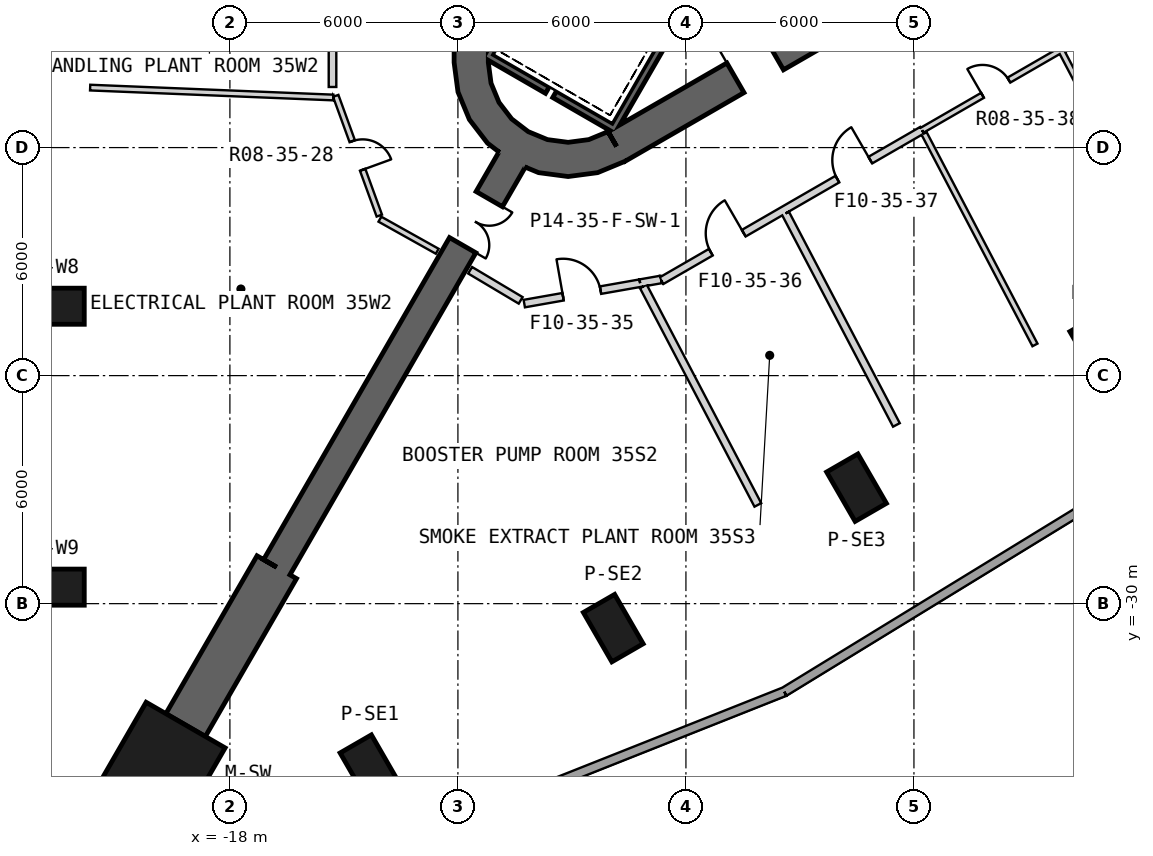
"""IFC4 building model, lengths in metres.
Left out: names, types, materials, properties, quantities, classifications, styles, units other than length and angle.
Written with IfcOpenShell. Run it as: python <this file> out.ifc"""

import sys

from ifc_helpers import new_model, si_unit, direction, frame, frame_2d, origin, origin_2d, place, context, subcontext, project, spatial, polyline, rectangle, outline, extrude, element, fill, save


model = new_model("IFC4")
c1 = context("Model", 3, precision=1e-05, world=origin(), true_north=direction((0.0, 1.0)))
c2 = subcontext(c1, "Body", "Model", "MODEL_VIEW")
j1 = project(units=[si_unit("LENGTHUNIT", "METRE"), si_unit("PLANEANGLEUNIT", "RADIAN")], contexts=[c1])
p1 = place(None, origin())
s1 = spatial("IfcSite", under=j1, at=p1, CompositionType="ELEMENT")
p2 = place(p1, origin())
s2 = spatial("IfcBuilding", under=s1, at=p2, CompositionType="ELEMENT")
p3 = place(p2, frame((0.0, 0.0, 163.2)))
s3 = spatial("IfcBuildingStorey", under=s2, at=p3, CompositionType="ELEMENT", Elevation=163.2)
p4 = place(p3, frame((-19.915, -34.494, 0.0), z_axis=(0.0, 0.0, 1.0), x_axis=(-0.5, -0.866025403784, 0.0)))
e1 = element("IfcColumn", 1, at=p4, inside=s3, PredefinedType="COLUMN", context=c2, shape_type="SweptSolid", body=[
    extrude(rectangle(XDim=3.0, YDim=2.4, at=origin_2d()), origin(), (0.0, 0.0, 1.0), 5.7),
])
for number, where, z_axis, x_axis in (
    (2, (-22.583, -22.174, 0.0), (0.0, 0.0, 1.0), (-1.0, 0.0, 0.0)),
    (3, (-22.583, -29.566, 0.0), (0.0, 0.0, 1.0), (-1.0, 0.0, 0.0)),
    (4, (-14.313, -34.34, 0.0), (0.0, 0.0, 1.0), (0.5, -0.866, 0.0)),
    (5, (-7.912, -30.644, 0.0), (0.0, 0.0, 1.0), (0.5, -0.866, 0.0)),
    (6, (-1.511, -26.948, 0.0), (0.0, 0.0, 1.0), (0.5, -0.866, 0.0)),
    (7, (4.89, -23.253, 0.0), (0.0, 0.0, 1.0), (0.5, -0.866, 0.0)),
):
    element("IfcColumn", number, at=place(p3, frame(where, z_axis=z_axis, x_axis=x_axis)), inside=s3, PredefinedType="COLUMN", context=c2, shape_type="SweptSolid", body=[
        extrude(rectangle(XDim=1.5, YDim=0.95, at=origin_2d()), origin(), (0.0, 0.0, 1.0), 5.7),
    ])
p5 = place(p3, frame((-11.65, 15.762, 0.0), z_axis=(0.0, 0.0, 1.0), x_axis=(0.0, -1.0, 0.0)))
e8 = element("IfcWall", 8, at=p5, inside=s3, PredefinedType="SHEAR", context=c2, shape_type="SweptSolid", body=[
    extrude(rectangle(XDim=31.523, YDim=0.9, at=frame_2d((15.762, 0.0))), origin(), (0.0, 0.0, 1.0), 6.0),
])
p6 = place(p5, frame((3.612, 0.0, 0.0)))
e9 = element("IfcOpeningElement", 9, at=p6, cuts=e8, PredefinedType="OPENING", context=c2, shape_type="SweptSolid", body=[
    extrude(rectangle(XDim=1.2, YDim=2.4, at=frame_2d((0.6, 1.2))), frame((0.0, 0.46, 0.0), z_axis=(0.0, -1.0, 0.0), x_axis=(1.0, 0.0, 0.0)), (0.0, 0.0, 1.0), 0.92),
])
p7 = place(p5, frame((26.712, 0.0, 0.0)))
e10 = element("IfcOpeningElement", 10, at=p7, cuts=e8, PredefinedType="OPENING", context=c2, shape_type="SweptSolid", body=[
    extrude(rectangle(XDim=1.2, YDim=2.4, at=frame_2d((0.6, 1.2))), frame((0.0, 0.46, 0.0), z_axis=(0.0, -1.0, 0.0), x_axis=(1.0, 0.0, 0.0)), (0.0, 0.0, 1.0), 0.92),
])
p8 = place(p3, frame((-7.825, -17.97, 0.0), z_axis=(0.0, 0.0, 1.0), x_axis=(0.866028369851, 0.499994862586, 0.0)))
e11 = element("IfcWall", 11, at=p8, inside=s3, PredefinedType="SHEAR", context=c2, shape_type="SweptSolid", body=[
    extrude(rectangle(XDim=31.523, YDim=0.9, at=frame_2d((15.762, 0.0))), origin(), (0.0, 0.0, 1.0), 6.0),
])
p9 = place(p8, frame((26.712, 0.0, 0.0)))
e12 = element("IfcOpeningElement", 12, at=p9, cuts=e11, PredefinedType="OPENING", context=c2, shape_type="SweptSolid", body=[
    extrude(rectangle(XDim=1.2, YDim=2.4, at=frame_2d((0.6, 1.2))), frame((0.0, 0.46, 0.0), z_axis=(0.0, -1.0, 0.0), x_axis=(1.0, 0.0, 0.0)), (0.0, 0.0, 1.0), 0.92),
])
p10 = place(p8, frame((3.612, 0.0, 0.0)))
e13 = element("IfcOpeningElement", 13, at=p10, cuts=e11, PredefinedType="OPENING", context=c2, shape_type="SweptSolid", body=[
    extrude(rectangle(XDim=1.2, YDim=2.4, at=frame_2d((0.6, 1.2))), frame((0.0, 0.46, 0.0), z_axis=(0.0, -1.0, 0.0), x_axis=(1.0, 0.0, 0.0)), (0.0, 0.0, 1.0), 0.92),
])
p11 = place(p3, origin())
e14 = element("IfcWall", 14, at=p11, inside=s3, PredefinedType="SHEAR", context=c2, shape_type="SweptSolid", body=[
    extrude(outline(polyline([(-12.1, -15.762), (-11.998, -16.538), (-11.698, -17.262), (-11.221, -17.883), (-10.6, -18.36), (-9.876, -18.659), (-9.1, -18.762), (-8.323, -18.659), (-7.6, -18.36), (-8.05, -17.58), (-8.556, -17.79), (-9.1, -17.862), (-9.644, -17.79), (-10.15, -17.58), (-10.585, -17.247), (-10.919, -16.812), (-11.128, -16.305), (-11.2, -15.762), (-12.1, -15.762)])), origin(), (0.0, 0.0, 1.0), 6.0),
])
p12 = place(p3, frame((-10.575, -18.316, 0.0), z_axis=(0.0, 0.0, 1.0), x_axis=(-0.500002326941, -0.86602406032, 0.0)))
e15 = element("IfcWall", 15, at=p12, inside=s3, PredefinedType="SHEAR", context=c2, shape_type="SweptSolid", body=[
    extrude(rectangle(XDim=12.384, YDim=0.8, at=frame_2d((6.192, 0.0))), origin(), (0.0, 0.0, 1.0), 6.0),
])
p13 = place(p12, frame((1.2, 0.0, 0.0)))
e16 = element("IfcOpeningElement", 16, at=p13, cuts=e15, PredefinedType="OPENING", context=c2, shape_type="SweptSolid", body=[
    extrude(rectangle(XDim=1.4, YDim=2.4, at=frame_2d((0.7, 1.2))), frame((0.0, 0.41, 0.0), z_axis=(0.0, -1.0, 0.0), x_axis=(1.0, 0.0, 0.0)), (0.0, 0.0, 1.0), 0.82),
])
p14 = place(p3, frame((-16.767, -29.041, -0.35), z_axis=(0.0, 0.0, 1.0), x_axis=(-0.499998569178, -0.866026229868, 0.0)))
e17 = element("IfcWall", 17, at=p14, inside=s3, PredefinedType="SHEAR", context=c2, shape_type="SweptSolid", body=[
    extrude(rectangle(XDim=4.796, YDim=1.2, at=frame_2d((2.398, 0.0))), origin(), (0.0, 0.0, 1.0), 6.35),
])
p15 = place(p3, frame((-15.368, -37.064, 0.0), z_axis=(0.0, 0.0, 1.0), x_axis=(0.929454976671, 0.368935558522, 0.0)))
e18 = element("IfcWall", 18, at=p15, inside=s3, PredefinedType="SOLIDWALL", context=c2, shape_type="SweptSolid", body=[
    extrude(rectangle(XDim=12.866, YDim=0.24, at=frame_2d((6.433, 0.0))), origin(), (0.0, 0.0, 1.0), 5.7),
])
p16 = place(p3, frame((-3.41, -32.318, 0.0), z_axis=(0.0, 0.0, 1.0), x_axis=(0.852773716093, 0.52228056554, 0.0)))
e19 = element("IfcWall", 19, at=p16, inside=s3, PredefinedType="SOLIDWALL", context=c2, shape_type="SweptSolid", body=[
    extrude(rectangle(XDim=38.239, YDim=0.24, at=frame_2d((19.12, 0.0))), origin(), (0.0, 0.0, 1.0), 5.7),
])
p17 = place(p3, frame((-3.905, -10.563, -0.35), z_axis=(0.0, 0.0, 1.0), x_axis=(-0.500012932018, -0.866017937352, 0.0)))
e20 = element("IfcWall", 20, at=p17, inside=s3, PredefinedType="SHEAR", context=c2, shape_type="SweptSolid", body=[
    extrude(rectangle(XDim=8.1, YDim=0.2, at=frame_2d((4.05, 0.0))), origin(), (0.0, 0.0, 1.0), 6.05),
])
p18 = place(p3, frame((-11.282, -15.541, -0.35), z_axis=(0.0, 0.0, 1.0), x_axis=(0.866000578957, -0.500042995397, 0.0)))
e21 = element("IfcWall", 21, at=p18, inside=s3, PredefinedType="SHEAR", context=c2, shape_type="SweptSolid", body=[
    extrude(rectangle(XDim=1.89, YDim=0.2, at=frame_2d((0.945, 0.0))), origin(), (0.0, 0.0, 1.0), 6.05),
])
p19 = place(p3, frame((-9.455, -16.596, -0.35), z_axis=(0.0, 0.0, 1.0), x_axis=(0.866038843867, -0.499976720371, 0.0)))
e22 = element("IfcWall", 22, at=p19, inside=s3, PredefinedType="SHEAR", context=c2, shape_type="SweptSolid", body=[
    extrude(rectangle(XDim=1.69, YDim=0.2, at=frame_2d((0.845, 0.0))), origin(), (0.0, 0.0, 1.0), 6.05),
])
p20 = place(p3, frame((-7.196, -8.663, -0.35), z_axis=(0.0, 0.0, 1.0), x_axis=(-0.499997992926, -0.866026562566, 0.0)))
e23 = element("IfcWall", 23, at=p20, inside=s3, PredefinedType="SHEAR", context=c2, shape_type="SweptSolid", body=[
    extrude(rectangle(XDim=7.9, YDim=0.2, at=frame_2d((3.95, 0.0))), origin(), (0.0, 0.0, 1.0), 6.05),
])
p21 = place(p3, frame((-15.3, 4.376, 0.0), z_axis=(0.0, 0.0, 1.0), x_axis=(0.0, -1.0, 0.0)))
e24 = element("IfcWall", 24, at=p21, inside=s3, PredefinedType="PARTITIONING", context=c2, shape_type="SweptSolid", body=[
    extrude(rectangle(XDim=20.781, YDim=0.2, at=frame_2d((10.391, 0.0))), origin(), (0.0, 0.0, 1.0), 4.88),
])
p22 = place(p21, frame((1.636, 0.0, 0.0)))
e25 = element("IfcOpeningElement", 25, at=p22, cuts=e24, PredefinedType="OPENING", context=c2, shape_type="SweptSolid", body=[
    extrude(rectangle(XDim=1.0, YDim=2.1, at=frame_2d((0.5, 1.05))), frame((0.0, 0.11, 0.0), z_axis=(0.0, -1.0, 0.0), x_axis=(1.0, 0.0, 0.0)), (0.0, 0.0, 1.0), 0.22),
])
p23 = place(p21, frame((5.846, 0.0, 0.0)))
e26 = element("IfcOpeningElement", 26, at=p23, cuts=e24, PredefinedType="OPENING", context=c2, shape_type="SweptSolid", body=[
    extrude(rectangle(XDim=1.0, YDim=2.1, at=frame_2d((0.5, 1.05))), frame((0.0, 0.11, 0.0), z_axis=(0.0, -1.0, 0.0), x_axis=(1.0, 0.0, 0.0)), (0.0, 0.0, 1.0), 0.22),
])
p24 = place(p21, frame((10.056, 0.0, 0.0)))
e27 = element("IfcOpeningElement", 27, at=p24, cuts=e24, PredefinedType="OPENING", context=c2, shape_type="SweptSolid", body=[
    extrude(rectangle(XDim=1.0, YDim=2.1, at=frame_2d((0.5, 1.05))), frame((0.0, 0.11, 0.0), z_axis=(0.0, -1.0, 0.0), x_axis=(1.0, 0.0, 0.0)), (0.0, 0.0, 1.0), 0.22),
])
p25 = place(p21, frame((14.266, 0.0, 0.0)))
e28 = element("IfcOpeningElement", 28, at=p25, cuts=e24, PredefinedType="OPENING", context=c2, shape_type="SweptSolid", body=[
    extrude(rectangle(XDim=1.0, YDim=2.1, at=frame_2d((0.5, 1.05))), frame((0.0, 0.11, 0.0), z_axis=(0.0, -1.0, 0.0), x_axis=(1.0, 0.0, 0.0)), (0.0, 0.0, 1.0), 0.22),
])
p26 = place(p21, frame((18.276, 0.0, 0.0)))
e29 = element("IfcOpeningElement", 29, at=p26, cuts=e24, PredefinedType="OPENING", context=c2, shape_type="SweptSolid", body=[
    extrude(rectangle(XDim=1.0, YDim=2.1, at=frame_2d((0.5, 1.05))), frame((0.0, 0.11, 0.0), z_axis=(0.0, -1.0, 0.0), x_axis=(1.0, 0.0, 0.0)), (0.0, 0.0, 1.0), 0.22),
])
p27 = place(p3, frame((-14.053, -19.884, 0.0), z_axis=(0.0, 0.0, 1.0), x_axis=(0.872734691985, -0.48819479453, 0.0)))
e30 = element("IfcWall", 30, at=p27, inside=s3, PredefinedType="PLUMBINGWALL", context=c2, shape_type="SweptSolid", body=[
    extrude(rectangle(XDim=1.729, YDim=0.15, at=frame_2d((0.864, 0.0))), origin(), (0.0, 0.0, 1.0), 5.7),
])
p28 = place(p3, frame((-15.215, -16.638, 0.0), z_axis=(0.0, 0.0, 1.0), x_axis=(0.342035327216, -0.939687094163, 0.0)))
e31 = element("IfcWall", 31, at=p28, inside=s3, PredefinedType="PLUMBINGWALL", context=c2, shape_type="SweptSolid", body=[
    extrude(rectangle(XDim=3.353, YDim=0.15, at=frame_2d((1.677, 0.0))), origin(), (0.0, 0.0, 1.0), 4.78),
])
p29 = place(p28, frame((1.27, 0.0, 0.0)))
e32 = element("IfcOpeningElement", 32, at=p29, cuts=e31, PredefinedType="OPENING", context=c2, shape_type="SweptSolid", body=[
    extrude(rectangle(XDim=0.8, YDim=2.1, at=frame_2d((0.4, 1.05))), frame((0.0, 0.085, 0.0), z_axis=(0.0, -1.0, 0.0), x_axis=(1.0, 0.0, 0.0)), (0.0, 0.0, 1.0), 0.17),
])
p30 = place(p3, frame((-15.279, -16.682, 0.0), z_axis=(0.0, 0.0, 1.0), x_axis=(-0.999169162386, 0.040755182944, 0.0)))
e33 = element("IfcWall", 33, at=p30, inside=s3, PredefinedType="PLUMBINGWALL", context=c2, shape_type="SweptSolid", body=[
    extrude(rectangle(XDim=6.404, YDim=0.15, at=frame_2d((3.202, 0.0))), origin(), (0.0, 0.0, 1.0), 4.88),
])
p31 = place(p3, frame((-10.254, -22.105, 0.0), z_axis=(0.0, 0.0, 1.0), x_axis=(0.984804988172, 0.173663857128, 0.0)))
e34 = element("IfcWall", 34, at=p31, inside=s3, PredefinedType="PARTITIONING", context=c2, shape_type="SweptSolid", body=[
    extrude(rectangle(XDim=3.096, YDim=0.2, at=frame_2d((1.548, 0.0))), origin(), (0.0, 0.0, 1.0), 4.78),
])
p32 = place(p31, frame((1.037, 0.0, 0.0)))
e35 = element("IfcOpeningElement", 35, at=p32, cuts=e34, PredefinedType="OPENING", context=c2, shape_type="SweptSolid", body=[
    extrude(rectangle(XDim=1.0, YDim=2.1, at=frame_2d((0.5, 1.05))), frame((0.0, 0.11, 0.0), z_axis=(0.0, -1.0, 0.0), x_axis=(1.0, 0.0, 0.0)), (0.0, 0.0, 1.0), 0.22),
])
p33 = place(p3, frame((-7.205, -21.567, 0.0), z_axis=(0.0, 0.0, 1.0), x_axis=(0.984801171005, 0.17368550195, 0.0)))
e36 = element("IfcWall", 36, at=p33, inside=s3, PredefinedType="PARTITIONING", context=c2, shape_type="SweptSolid", body=[
    extrude(rectangle(XDim=0.558, YDim=0.2, at=frame_2d((0.279, 0.0))), origin(), (0.0, 0.0, 1.0), 5.7),
])
p34 = place(p3, frame((-11.678, -21.228, 0.0), z_axis=(0.0, 0.0, 1.0), x_axis=(0.85913105886, -0.511755628891, 0.0)))
e37 = element("IfcWall", 37, at=p34, inside=s3, PredefinedType="PARTITIONING", context=c2, shape_type="SweptSolid", body=[
    extrude(rectangle(XDim=1.548, YDim=0.2, at=frame_2d((0.774, 0.0))), origin(), (0.0, 0.0, 1.0), 5.7),
])
p35 = place(p3, frame((-6.644, -21.503, 0.0), z_axis=(0.0, 0.0, 1.0), x_axis=(0.866024386084, 0.500001762705, 0.0)))
e38 = element("IfcWall", 38, at=p35, inside=s3, PredefinedType="PARTITIONING", context=c2, shape_type="SweptSolid", body=[
    extrude(rectangle(XDim=7.919, YDim=0.2, at=frame_2d((3.96, 0.0))), origin(), (0.0, 0.0, 1.0), 4.88),
])
p36 = place(p35, frame((1.5, 0.0, 0.0)))
e39 = element("IfcOpeningElement", 39, at=p36, cuts=e38, PredefinedType="OPENING", context=c2, shape_type="SweptSolid", body=[
    extrude(rectangle(XDim=1.0, YDim=2.1, at=frame_2d((0.5, 1.05))), frame((0.0, 0.11, 0.0), z_axis=(0.0, -1.0, 0.0), x_axis=(1.0, 0.0, 0.0)), (0.0, 0.0, 1.0), 0.22),
])
p37 = place(p35, frame((5.346, 0.0, 0.0)))
e40 = element("IfcOpeningElement", 40, at=p37, cuts=e38, PredefinedType="OPENING", context=c2, shape_type="SweptSolid", body=[
    extrude(rectangle(XDim=1.0, YDim=2.1, at=frame_2d((0.5, 1.05))), frame((0.0, 0.11, 0.0), z_axis=(0.0, -1.0, 0.0), x_axis=(1.0, 0.0, 0.0)), (0.0, 0.0, 1.0), 0.22),
])
p38 = place(p3, frame((3.86, -15.438, 0.0), z_axis=(0.0, 0.0, 1.0), x_axis=(0.866025161861, 0.500000419024, 0.0)))
e41 = element("IfcWall", 41, at=p38, inside=s3, PredefinedType="PARTITIONING", context=c2, shape_type="SweptSolid", body=[
    extrude(rectangle(XDim=20.781, YDim=0.2, at=frame_2d((10.391, 0.0))), origin(), (0.0, 0.0, 1.0), 4.88),
])
p39 = place(p38, frame((1.636, 0.0, 0.0)))
e42 = element("IfcOpeningElement", 42, at=p39, cuts=e41, PredefinedType="OPENING", context=c2, shape_type="SweptSolid", body=[
    extrude(rectangle(XDim=1.0, YDim=2.1, at=frame_2d((0.5, 1.05))), frame((0.0, 0.11, 0.0), z_axis=(0.0, -1.0, 0.0), x_axis=(1.0, 0.0, 0.0)), (0.0, 0.0, 1.0), 0.22),
])
p40 = place(p38, frame((5.846, 0.0, 0.0)))
e43 = element("IfcOpeningElement", 43, at=p40, cuts=e41, PredefinedType="OPENING", context=c2, shape_type="SweptSolid", body=[
    extrude(rectangle(XDim=1.0, YDim=2.1, at=frame_2d((0.5, 1.05))), frame((0.0, 0.11, 0.0), z_axis=(0.0, -1.0, 0.0), x_axis=(1.0, 0.0, 0.0)), (0.0, 0.0, 1.0), 0.22),
])
p41 = place(p38, frame((10.056, 0.0, 0.0)))
e44 = element("IfcOpeningElement", 44, at=p41, cuts=e41, PredefinedType="OPENING", context=c2, shape_type="SweptSolid", body=[
    extrude(rectangle(XDim=1.0, YDim=2.1, at=frame_2d((0.5, 1.05))), frame((0.0, 0.11, 0.0), z_axis=(0.0, -1.0, 0.0), x_axis=(1.0, 0.0, 0.0)), (0.0, 0.0, 1.0), 0.22),
])
p42 = place(p38, frame((14.266, 0.0, 0.0)))
e45 = element("IfcOpeningElement", 45, at=p42, cuts=e41, PredefinedType="OPENING", context=c2, shape_type="SweptSolid", body=[
    extrude(rectangle(XDim=1.0, YDim=2.1, at=frame_2d((0.5, 1.05))), frame((0.0, 0.11, 0.0), z_axis=(0.0, -1.0, 0.0), x_axis=(1.0, 0.0, 0.0)), (0.0, 0.0, 1.0), 0.22),
])
p43 = place(p38, frame((18.276, 0.0, 0.0)))
e46 = element("IfcOpeningElement", 46, at=p43, cuts=e41, PredefinedType="OPENING", context=c2, shape_type="SweptSolid", body=[
    extrude(rectangle(XDim=1.0, YDim=2.1, at=frame_2d((0.5, 1.05))), frame((0.0, 0.11, 0.0), z_axis=(0.0, -1.0, 0.0), x_axis=(1.0, 0.0, 0.0)), (0.0, 0.0, 1.0), 0.22),
])
p44 = place(p3, frame((0.214, -17.543, 0.0), z_axis=(0.0, 0.0, 1.0), x_axis=(0.866029143232, 0.499993523031, 0.0)))
e47 = element("IfcWall", 47, at=p44, inside=s3, PredefinedType="PLUMBINGWALL", context=c2, shape_type="SweptSolid", body=[
    extrude(rectangle(XDim=4.21, YDim=0.15, at=frame_2d((2.105, 0.0))), origin(), (0.0, 0.0, 1.0), 4.98),
])
p45 = place(p44, frame((1.836, 0.0, 0.0)))
e48 = element("IfcOpeningElement", 48, at=p45, cuts=e47, PredefinedType="OPENING", context=c2, shape_type="SweptSolid", body=[
    extrude(rectangle(XDim=0.8, YDim=2.1, at=frame_2d((0.4, 1.05))), frame((0.0, 0.085, 0.0), z_axis=(0.0, -1.0, 0.0), x_axis=(1.0, 0.0, 0.0)), (0.0, 0.0, 1.0), 0.17),
])
p46 = place(p3, frame((-4.107, -27.402, 0.0), z_axis=(0.0, 0.0, 1.0), x_axis=(-0.464120846415, 0.885771889328, 0.0)))
e49 = element("IfcWall", 49, at=p46, inside=s3, PredefinedType="PARTITIONING", context=c2, shape_type="SweptSolid", body=[
    extrude(rectangle(XDim=6.49, YDim=0.2, at=frame_2d((3.245, 0.0))), origin(), (0.0, 0.0, 1.0), 4.88),
])
p47 = place(p3, frame((-0.461, -25.297, 0.0), z_axis=(0.0, 0.0, 1.0), x_axis=(-0.464291570552, 0.885682413461, 0.0)))
e50 = element("IfcWall", 50, at=p47, inside=s3, PredefinedType="PARTITIONING", context=c2, shape_type="SweptSolid", body=[
    extrude(rectangle(XDim=6.283, YDim=0.2, at=frame_2d((3.141, 0.0))), origin(), (0.0, 0.0, 1.0), 4.98),
])
p48 = place(p3, frame((3.184, -23.192, 0.0), z_axis=(0.0, 0.0, 1.0), x_axis=(-0.464291570552, 0.885682413461, 0.0)))
e51 = element("IfcWall", 51, at=p48, inside=s3, PredefinedType="PLUMBINGWALL", context=c2, shape_type="SweptSolid", body=[
    extrude(rectangle(XDim=6.283, YDim=0.15, at=frame_2d((3.141, 0.0))), origin(), (0.0, 0.0, 1.0), 5.7),
])
p49 = place(p3, frame((3.902, -15.501, 0.0), z_axis=(0.0, 0.0, 1.0), x_axis=(0.464270197844, -0.885693617113, 0.0)))
e52 = element("IfcWall", 52, at=p49, inside=s3, PredefinedType="PLUMBINGWALL", context=c2, shape_type="SweptSolid", body=[
    extrude(rectangle(XDim=6.308, YDim=0.15, at=frame_2d((3.154, 0.0))), origin(), (0.0, 0.0, 1.0), 5.7),
])
p50 = place(p29, origin())
e53 = element("IfcDoor", 53, at=p50, inside=s3, OperationType="SINGLE_SWING_RIGHT", PredefinedType="USERDEFINED", context=c2, shape_type="SweptSolid", body=[
    extrude(rectangle(XDim=0.8, YDim=2.1, at=frame_2d((0.4, 1.05))), frame((0.0, 0.025, 0.0), z_axis=(0.0, -1.0, 0.0), x_axis=(1.0, 0.0, 0.0)), (0.0, 0.0, 1.0), 0.05),
])
fill(e32, e53)
p51 = place(p32, origin())
e54 = element("IfcDoor", 54, at=p51, inside=s3, OperationType="SINGLE_SWING_LEFT", PredefinedType="USERDEFINED", context=c2, shape_type="SweptSolid", body=[
    extrude(rectangle(XDim=1.0, YDim=2.1, at=frame_2d((0.5, 1.05))), frame((0.0, 0.025, 0.0), z_axis=(0.0, -1.0, 0.0), x_axis=(1.0, 0.0, 0.0)), (0.0, 0.0, 1.0), 0.05),
])
fill(e35, e54)
p52 = place(p36, origin())
e55 = element("IfcDoor", 55, at=p52, inside=s3, OperationType="SINGLE_SWING_RIGHT", PredefinedType="USERDEFINED", context=c2, shape_type="SweptSolid", body=[
    extrude(rectangle(XDim=1.0, YDim=2.1, at=frame_2d((0.5, 1.05))), frame((0.0, 0.025, 0.0), z_axis=(0.0, -1.0, 0.0), x_axis=(1.0, 0.0, 0.0)), (0.0, 0.0, 1.0), 0.05),
])
fill(e39, e55)
p53 = place(p37, origin())
e56 = element("IfcDoor", 56, at=p53, inside=s3, OperationType="SINGLE_SWING_RIGHT", PredefinedType="USERDEFINED", context=c2, shape_type="SweptSolid", body=[
    extrude(rectangle(XDim=1.0, YDim=2.1, at=frame_2d((0.5, 1.05))), frame((0.0, 0.025, 0.0), z_axis=(0.0, -1.0, 0.0), x_axis=(1.0, 0.0, 0.0)), (0.0, 0.0, 1.0), 0.05),
])
fill(e40, e56)
p54 = place(p45, origin())
e57 = element("IfcDoor", 57, at=p54, inside=s3, OperationType="SINGLE_SWING_LEFT", PredefinedType="USERDEFINED", context=c2, shape_type="SweptSolid", body=[
    extrude(rectangle(XDim=0.8, YDim=2.1, at=frame_2d((0.4, 1.05))), frame((0.0, 0.025, 0.0), z_axis=(0.0, -1.0, 0.0), x_axis=(1.0, 0.0, 0.0)), (0.0, 0.0, 1.0), 0.05),
])
fill(e48, e57)
p55 = place(p10, origin())
e58 = element("IfcDoor", 58, at=p55, inside=s3, OperationType="SINGLE_SWING_LEFT", PredefinedType="USERDEFINED", context=c2, shape_type="SweptSolid", body=[
    extrude(rectangle(XDim=1.2, YDim=2.4, at=frame_2d((0.6, 1.2))), frame((0.0, 0.025, 0.0), z_axis=(0.0, -1.0, 0.0), x_axis=(1.0, 0.0, 0.0)), (0.0, 0.0, 1.0), 0.05),
])
fill(e13, e58)
p56 = place(p13, origin())
e59 = element("IfcDoor", 59, at=p56, inside=s3, OperationType="DOUBLE_DOOR_SINGLE_SWING", PredefinedType="NOTDEFINED", context=c2, shape_type="SweptSolid", body=[
    extrude(rectangle(XDim=1.4, YDim=2.4, at=frame_2d((0.7, 1.2))), frame((0.0, 0.025, 0.0), z_axis=(0.0, -1.0, 0.0), x_axis=(1.0, 0.0, 0.0)), (0.0, 0.0, 1.0), 0.05),
])
fill(e16, e59)
save(model, sys.argv[1])
